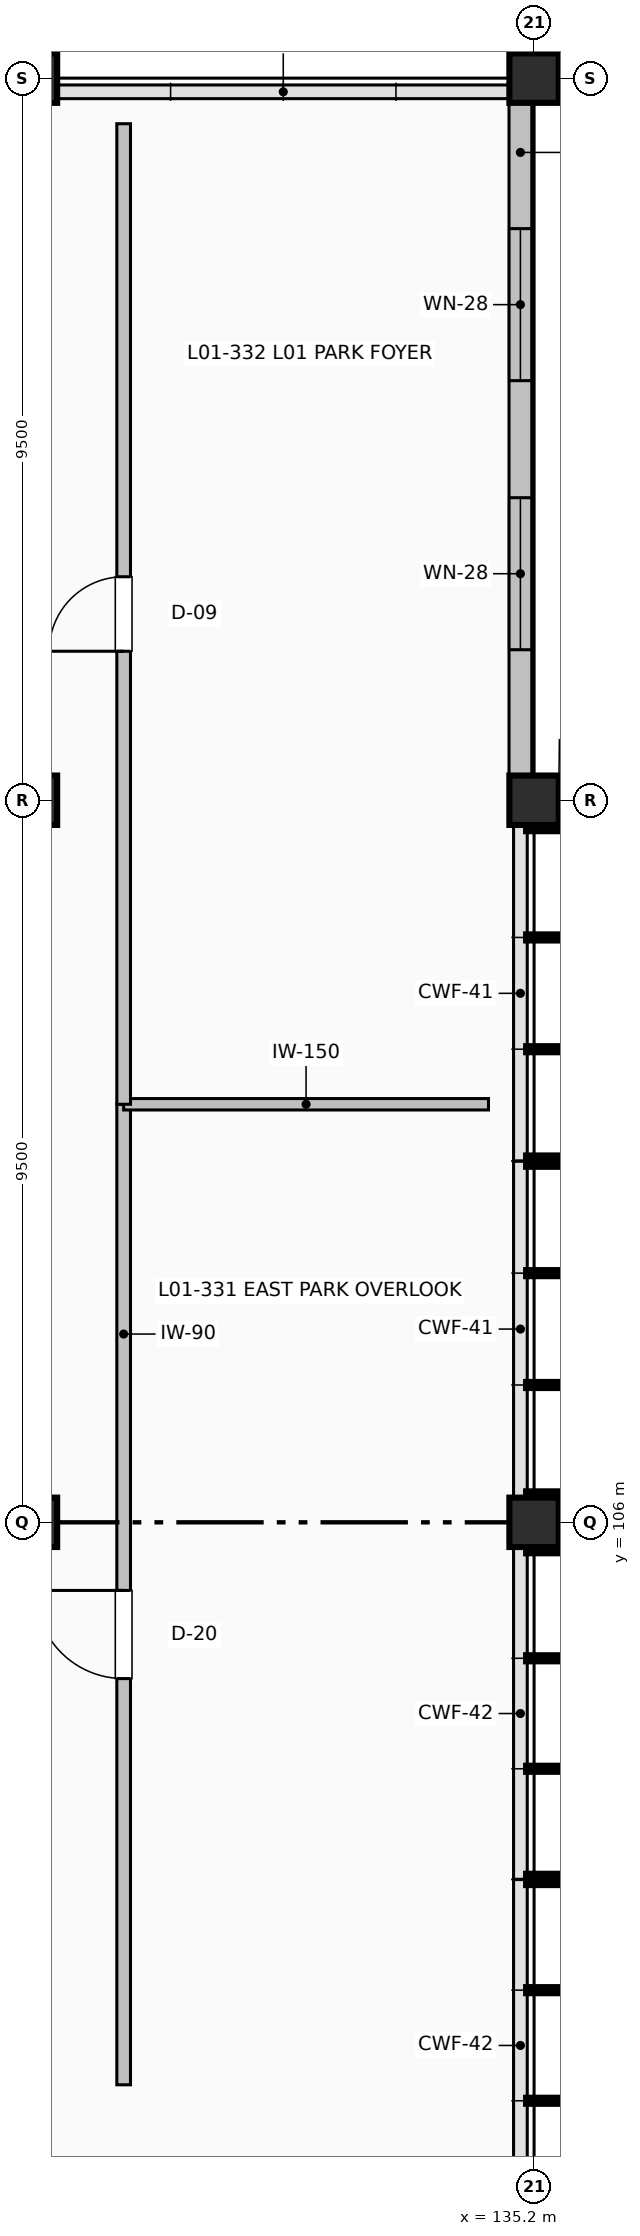
"""IFC4 building model, lengths in metres.
Left out: names, types, materials, properties, quantities, classifications, styles, units other than length and angle.
Written with IfcOpenShell. Run it as: python <this file> out.ifc"""

import sys

from ifc_helpers import new_model, si_unit, direction, frame, frame_2d, origin, origin_2d, place, context, subcontext, project, spatial, rectangle, extrude, element, fill, save


model = new_model("IFC4")
c1 = context("Model", 3, precision=1e-05, world=origin(), true_north=direction((0.0, 1.0)))
c2 = subcontext(c1, "Body", "Model", "MODEL_VIEW")
j1 = project(units=[si_unit("LENGTHUNIT", "METRE"), si_unit("PLANEANGLEUNIT", "RADIAN")], contexts=[c1])
p1 = place(None, origin())
s1 = spatial("IfcSite", under=j1, at=p1, CompositionType="ELEMENT")
p2 = place(p1, origin())
s2 = spatial("IfcBuilding", under=s1, at=p2, CompositionType="ELEMENT")
p3 = place(p2, frame((0.0, 0.0, 5.4)))
s3 = spatial("IfcBuildingStorey", under=s2, at=p3, CompositionType="ELEMENT", Elevation=5.4)
for number, where, z_axis, x_axis in (
    (1, (128.6, 106.0, 0.0), (0.0, 0.0, 1.0), (1.0, 0.0, 0.0)),
    (2, (128.6, 115.5, 0.0), (0.0, 0.0, 1.0), (1.0, 0.0, 0.0)),
    (3, (128.6, 125.0, 0.0), (0.0, 0.0, 1.0), (1.0, 0.0, 0.0)),
    (4, (135.2, 106.0, 0.0), (0.0, 0.0, 1.0), (1.0, 0.0, 0.0)),
    (5, (135.2, 115.5, 0.0), (0.0, 0.0, 1.0), (1.0, 0.0, 0.0)),
    (6, (135.2, 125.0, 0.0), (0.0, 0.0, 1.0), (1.0, 0.0, 0.0)),
):
    element("IfcColumn", number, at=place(p3, frame(where, z_axis=z_axis, x_axis=x_axis)), inside=s3, PredefinedType="COLUMN", context=c2, shape_type="SweptSolid", body=[
        extrude(rectangle(XDim=0.65, YDim=0.65, at=origin_2d()), origin(), (0.0, 0.0, 1.0), 4.8),
    ])
p4 = place(p3, frame((135.02, 124.675, 0.0), z_axis=(0.0, 0.0, 1.0), x_axis=(0.0, -1.0, 0.0)))
e7 = element("IfcWall", 7, at=p4, inside=s3, PredefinedType="SOLIDWALL", context=c2, shape_type="SweptSolid", body=[
    extrude(rectangle(XDim=8.85, YDim=0.3, at=frame_2d((4.425, 0.0))), origin(), (0.0, 0.0, 1.0), 3.592),
])
p5 = place(p4, frame((1.655, 0.0, 1.0)))
e8 = element("IfcOpeningElement", 8, at=p5, cuts=e7, PredefinedType="OPENING", context=c2, shape_type="SweptSolid", body=[
    extrude(rectangle(XDim=2.0, YDim=1.5, at=frame_2d((1.0, 0.75))), frame((0.0, 0.16, 0.0), z_axis=(0.0, -1.0, 0.0), x_axis=(1.0, 0.0, 0.0)), (0.0, 0.0, 1.0), 0.32),
])
p6 = place(p4, frame((5.195, 0.0, 1.0)))
e9 = element("IfcOpeningElement", 9, at=p6, cuts=e7, PredefinedType="OPENING", context=c2, shape_type="SweptSolid", body=[
    extrude(rectangle(XDim=2.0, YDim=1.5, at=frame_2d((1.0, 0.75))), frame((0.0, 0.16, 0.0), z_axis=(0.0, -1.0, 0.0), x_axis=(1.0, 0.0, 0.0)), (0.0, 0.0, 1.0), 0.32),
])
p7 = place(p3, frame((129.8, 98.6, 0.0), z_axis=(0.0, 0.0, 1.0), x_axis=(0.0, 1.0, 0.0)))
e10 = element("IfcWall", 10, at=p7, inside=s3, PredefinedType="PARTITIONING", context=c2, shape_type="SweptSolid", body=[
    extrude(rectangle(XDim=12.9, YDim=0.18, at=frame_2d((6.45, 0.0))), origin(), (0.0, 0.0, 1.0), 4.492),
])
p8 = place(p7, frame((5.344, 0.0, 0.0)))
e11 = element("IfcOpeningElement", 11, at=p8, cuts=e10, PredefinedType="OPENING", context=c2, shape_type="SweptSolid", body=[
    extrude(rectangle(XDim=1.16, YDim=2.1, at=frame_2d((0.58, 1.05))), frame((0.0, 0.1, 0.0), z_axis=(0.0, -1.0, 0.0), x_axis=(1.0, 0.0, 0.0)), (0.0, 0.0, 1.0), 0.2),
])
p9 = place(p3, frame((129.8, 111.5, 0.0), z_axis=(0.0, 0.0, 1.0), x_axis=(1.0, 0.0, 0.0)))
e12 = element("IfcWall", 12, at=p9, inside=s3, PredefinedType="PARTITIONING", context=c2, shape_type="SweptSolid", body=[
    extrude(rectangle(XDim=4.8, YDim=0.15, at=frame_2d((2.4, 0.0))), origin(), (0.0, 0.0, 1.0), 4.492),
])
p10 = place(p3, frame((129.8, 111.5, 0.0), z_axis=(0.0, 0.0, 1.0), x_axis=(0.0, 1.0, 0.0)))
e13 = element("IfcWall", 13, at=p10, inside=s3, PredefinedType="PARTITIONING", context=c2, shape_type="SweptSolid", body=[
    extrude(rectangle(XDim=12.9, YDim=0.18, at=frame_2d((6.45, 0.0))), origin(), (0.0, 0.0, 1.0), 4.492),
])
p11 = place(p10, frame((5.96, 0.0, 0.0)))
e14 = element("IfcOpeningElement", 14, at=p11, cuts=e13, PredefinedType="OPENING", context=c2, shape_type="SweptSolid", body=[
    extrude(rectangle(XDim=0.98, YDim=2.08, at=frame_2d((0.49, 1.04))), frame((0.0, 0.1, 0.0), z_axis=(0.0, -1.0, 0.0), x_axis=(1.0, 0.0, 0.0)), (0.0, 0.0, 1.0), 0.2),
])
p12 = place(p5, origin())
e15 = element("IfcWindow", 15, at=p12, inside=s3, PartitioningType="SINGLE_PANEL", PredefinedType="WINDOW", context=c2, shape_type="SweptSolid", body=[
    extrude(rectangle(XDim=2.0, YDim=1.5, at=frame_2d((1.0, 0.75))), frame((0.0, 0.03, 0.0), z_axis=(0.0, -1.0, 0.0), x_axis=(1.0, 0.0, 0.0)), (0.0, 0.0, 1.0), 0.06),
])
fill(e8, e15)
p13 = place(p6, origin())
e16 = element("IfcWindow", 16, at=p13, inside=s3, PartitioningType="SINGLE_PANEL", PredefinedType="WINDOW", context=c2, shape_type="SweptSolid", body=[
    extrude(rectangle(XDim=2.0, YDim=1.5, at=frame_2d((1.0, 0.75))), frame((0.0, 0.03, 0.0), z_axis=(0.0, -1.0, 0.0), x_axis=(1.0, 0.0, 0.0)), (0.0, 0.0, 1.0), 0.06),
])
fill(e9, e16)
p14 = place(p8, origin())
e17 = element("IfcDoor", 17, at=p14, inside=s3, OperationType="SINGLE_SWING_RIGHT", PredefinedType="DOOR", context=c2, shape_type="SweptSolid", body=[
    extrude(rectangle(XDim=1.16, YDim=2.1, at=frame_2d((0.58, 1.05))), frame((0.0, 0.025, 0.0), z_axis=(0.0, -1.0, 0.0), x_axis=(1.0, 0.0, 0.0)), (0.0, 0.0, 1.0), 0.05),
])
fill(e11, e17)
p15 = place(p11, origin())
e18 = element("IfcDoor", 18, at=p15, inside=s3, OperationType="SINGLE_SWING_LEFT", PredefinedType="DOOR", context=c2, shape_type="SweptSolid", body=[
    extrude(rectangle(XDim=0.98, YDim=2.08, at=frame_2d((0.49, 1.04))), frame((0.0, 0.025, 0.0), z_axis=(0.0, -1.0, 0.0), x_axis=(1.0, 0.0, 0.0)), (0.0, 0.0, 1.0), 0.05),
])
fill(e14, e18)
save(model, sys.argv[1])
